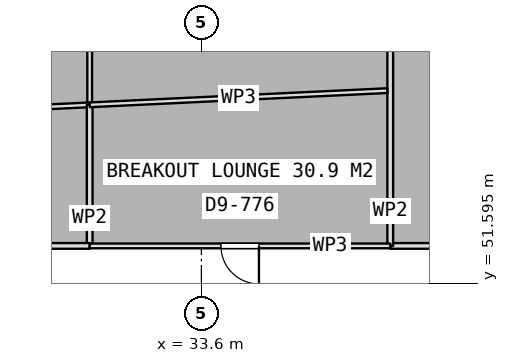
"""IFC4 building model, lengths in metres.
Left out: names, types, materials, properties, quantities, classifications, styles, units other than length and angle.
Written with IfcOpenShell. Run it as: python <this file> out.ifc"""

import sys

from ifc_helpers import new_model, si_unit, direction, frame, frame_2d, origin, place, context, subcontext, project, spatial, rectangle, extrude, element, fill, save


model = new_model("IFC4")
c1 = context("Model", 3, precision=1e-05, world=origin(), true_north=direction((0.0, 1.0)))
c2 = subcontext(c1, "Body", "Model", "MODEL_VIEW")
j1 = project(units=[si_unit("LENGTHUNIT", "METRE"), si_unit("PLANEANGLEUNIT", "RADIAN")], contexts=[c1])
p1 = place(None, origin())
s1 = spatial("IfcSite", under=j1, at=p1, CompositionType="ELEMENT")
p2 = place(p1, origin())
s2 = spatial("IfcBuilding", under=s1, at=p2, CompositionType="ELEMENT")
p3 = place(p2, frame((0.0, 0.0, 191.45)))
s3 = spatial("IfcBuildingStorey", under=s2, at=p3, CompositionType="ELEMENT", Elevation=191.45)
p4 = place(p3, frame((30.661, 61.313, 0.0), z_axis=(0.0, 0.0, 1.0), x_axis=(0.0, -1.0, 0.0)))
e1 = element("IfcWall", 1, at=p4, inside=s3, PredefinedType="PARTITIONING", context=c2, shape_type="SweptSolid", body=[
    extrude(rectangle(XDim=5.026, YDim=0.125, at=frame_2d((2.513, 0.0))), origin(), (0.0, 0.0, 1.0), 3.5),
])
p5 = place(p3, frame((30.661, 56.287, 0.0), z_axis=(0.0, 0.0, 1.0), x_axis=(-0.998854187389, -0.047857207772, 0.0)))
e2 = element("IfcWall", 2, at=p5, inside=s3, PredefinedType="PARTITIONING", context=c2, shape_type="SweptSolid", body=[
    extrude(rectangle(XDim=5.918, YDim=0.125, at=frame_2d((2.959, 0.0))), origin(), (0.0, 0.0, 1.0), 3.5),
])
p6 = place(p5, frame((2.459, 0.0, 0.0)))
e3 = element("IfcOpeningElement", 3, at=p6, cuts=e2, PredefinedType="OPENING", context=c2, shape_type="SweptSolid", body=[
    extrude(rectangle(XDim=1.0, YDim=2.1, at=frame_2d((0.5, 1.05))), frame((0.0, 0.073, 0.0), z_axis=(0.0, -1.0, 0.0), x_axis=(1.0, 0.0, 0.0)), (0.0, 0.0, 1.0), 0.145),
])
p7 = place(p3, frame((53.2, 52.575, 0.0), z_axis=(0.0, 0.0, 1.0), x_axis=(-1.0, 0.0, 0.0)))
e4 = element("IfcWall", 4, at=p7, inside=s3, PredefinedType="PARTITIONING", context=c2, shape_type="SweptSolid", body=[
    extrude(rectangle(XDim=14.63, YDim=0.15, at=frame_2d((7.315, 0.0))), origin(), (0.0, 0.0, 1.0), 3.5),
])
p8 = place(p3, frame((38.57, 52.575, 0.0), z_axis=(0.0, 0.0, 1.0), x_axis=(0.0, 1.0, 0.0)))
e5 = element("IfcWall", 5, at=p8, inside=s3, PredefinedType="PARTITIONING", context=c2, shape_type="SweptSolid", body=[
    extrude(rectangle(XDim=9.116, YDim=0.15, at=frame_2d((4.558, 0.0))), origin(), (0.0, 0.0, 1.0), 3.5),
])
p9 = place(p8, frame((5.703, 0.0, 0.0)))
e6 = element("IfcOpeningElement", 6, at=p9, cuts=e5, PredefinedType="OPENING", context=c2, shape_type="SweptSolid", body=[
    extrude(rectangle(XDim=1.8, YDim=2.1, at=frame_2d((0.9, 1.05))), frame((0.0, 0.085, 0.0), z_axis=(0.0, -1.0, 0.0), x_axis=(1.0, 0.0, 0.0)), (0.0, 0.0, 1.0), 0.17),
])
p10 = place(p3, frame((30.661, 56.287, 0.0), z_axis=(0.0, 0.0, 1.0), x_axis=(0.0, -1.0, 0.0)))
e7 = element("IfcWall", 7, at=p10, inside=s3, PredefinedType="PARTITIONING", context=c2, shape_type="SweptSolid", body=[
    extrude(rectangle(XDim=3.712, YDim=0.15, at=frame_2d((1.856, 0.0))), origin(), (0.0, 0.0, 1.0), 3.5),
])
p11 = place(p3, frame((30.661, 52.575, 0.0), z_axis=(0.0, 0.0, 1.0), x_axis=(-1.0, 0.0, 0.0)))
e8 = element("IfcWall", 8, at=p11, inside=s3, PredefinedType="PARTITIONING", context=c2, shape_type="SweptSolid", body=[
    extrude(rectangle(XDim=8.51, YDim=0.15, at=frame_2d((4.255, 0.0))), origin(), (0.0, 0.0, 1.0), 3.5),
])
p12 = place(p11, frame((3.631, 0.0, 0.0)))
e9 = element("IfcOpeningElement", 9, at=p12, cuts=e8, PredefinedType="OPENING", context=c2, shape_type="SweptSolid", body=[
    extrude(rectangle(XDim=1.0, YDim=2.1, at=frame_2d((0.5, 1.05))), frame((0.0, 0.085, 0.0), z_axis=(0.0, -1.0, 0.0), x_axis=(1.0, 0.0, 0.0)), (0.0, 0.0, 1.0), 0.17),
])
p13 = place(p3, frame((38.495, 56.661, 0.0), z_axis=(0.0, 0.0, 1.0), x_axis=(-0.998863767156, -0.047656842766, 0.0)))
e10 = element("IfcWall", 10, at=p13, inside=s3, PredefinedType="PARTITIONING", context=c2, shape_type="SweptSolid", body=[
    extrude(rectangle(XDim=7.843, YDim=0.125, at=frame_2d((3.922, 0.0))), origin(), (0.0, 0.0, 1.0), 3.5),
])
p14 = place(p3, frame((38.57, 52.575, 0.0), z_axis=(0.0, 0.0, 1.0), x_axis=(-1.0, 0.0, 0.0)))
e11 = element("IfcWall", 11, at=p14, inside=s3, PredefinedType="PARTITIONING", context=c2, shape_type="SweptSolid", body=[
    extrude(rectangle(XDim=7.909, YDim=0.125, at=frame_2d((3.955, 0.0))), origin(), (0.0, 0.0, 1.0), 3.5),
])
p15 = place(p14, frame((3.455, 0.0, 0.0)))
e12 = element("IfcOpeningElement", 12, at=p15, cuts=e11, PredefinedType="OPENING", context=c2, shape_type="SweptSolid", body=[
    extrude(rectangle(XDim=1.0, YDim=2.1, at=frame_2d((0.5, 1.05))), frame((0.0, 0.073, 0.0), z_axis=(0.0, -1.0, 0.0), x_axis=(1.0, 0.0, 0.0)), (0.0, 0.0, 1.0), 0.145),
])
p16 = place(p15, origin())
e13 = element("IfcDoor", 13, at=p16, inside=s3, OperationType="SINGLE_SWING_LEFT", PredefinedType="DOOR", context=c2, shape_type="SweptSolid", body=[
    extrude(rectangle(XDim=1.0, YDim=2.1, at=frame_2d((0.5, 1.05))), frame((0.0, 0.025, 0.0), z_axis=(0.0, -1.0, 0.0), x_axis=(1.0, 0.0, 0.0)), (0.0, 0.0, 1.0), 0.05),
])
fill(e12, e13)
save(model, sys.argv[1])
